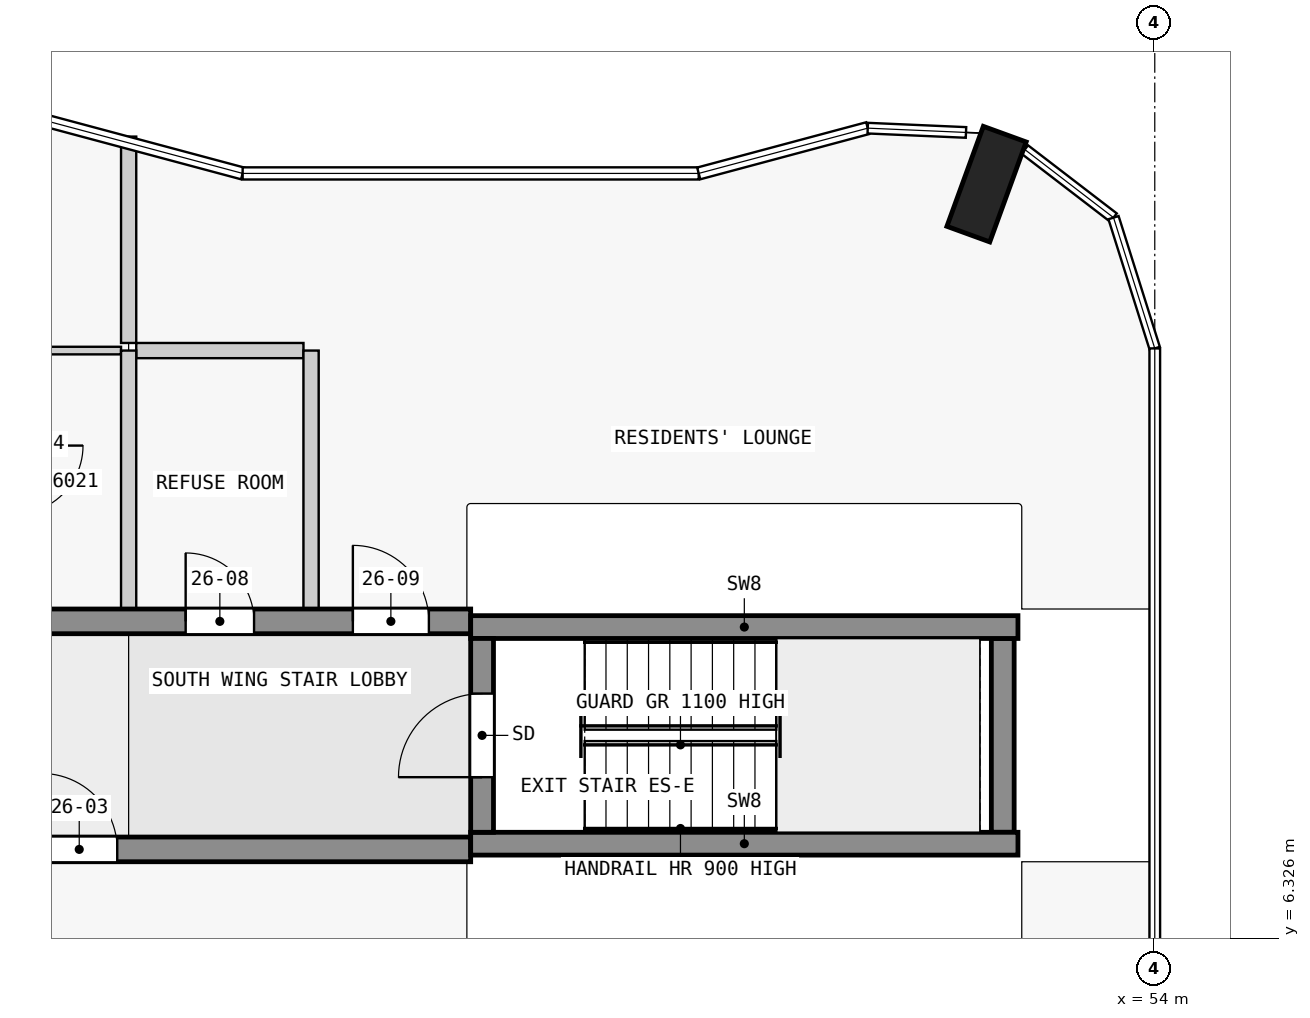
"""IFC4 building model, lengths in metres.
Left out: names, types, materials, properties, quantities, classifications, styles, units other than length and angle.
Written with IfcOpenShell. Run it as: python <this file> out.ifc"""

import sys

from ifc_helpers import new_model, si_unit, direction, frame, frame_2d, origin, origin_2d, place, context, subcontext, project, spatial, rectangle, extrude, element, fill, save


model = new_model("IFC4")
c1 = context("Model", 3, precision=1e-05, world=origin(), true_north=direction((0.0, 1.0)))
c2 = subcontext(c1, "Body", "Model", "MODEL_VIEW")
j1 = project(units=[si_unit("LENGTHUNIT", "METRE"), si_unit("PLANEANGLEUNIT", "RADIAN")], contexts=[c1])
p1 = place(None, origin())
s1 = spatial("IfcSite", under=j1, at=p1, CompositionType="ELEMENT")
p2 = place(p1, origin())
s2 = spatial("IfcBuilding", under=s1, at=p2, CompositionType="ELEMENT")
p3 = place(p2, frame((0.0, 0.0, 102.8)))
s3 = spatial("IfcBuildingStorey", under=s2, at=p3, CompositionType="ELEMENT", Elevation=102.8)
p4 = place(p3, frame((51.787, 16.252, 0.0), z_axis=(0.0, 0.0, 1.0), x_axis=(-0.939664280925, 0.342097996418, 0.0)))
e1 = element("IfcColumn", 1, at=p4, inside=s3, PredefinedType="COLUMN", context=c2, shape_type="SweptSolid", body=[
    extrude(rectangle(XDim=0.6, YDim=1.4, at=origin_2d()), origin(), (0.0, 0.0, 1.0), 3.5),
])
p5 = place(p3, frame((45.15, 7.725, 0.0), z_axis=(0.0, 0.0, 1.0), x_axis=(0.0, 1.0, 0.0)))
e2 = element("IfcWall", 2, at=p5, inside=s3, PredefinedType="SHEAR", context=c2, shape_type="SweptSolid", body=[
    extrude(rectangle(XDim=2.55, YDim=0.3, at=frame_2d((1.275, 0.0))), origin(), (0.0, 0.0, 1.0), 3.5),
])
p6 = place(p5, frame((0.725, 0.0, 0.0)))
e3 = element("IfcOpeningElement", 3, at=p6, cuts=e2, PredefinedType="OPENING", context=c2, shape_type="SweptSolid", body=[
    extrude(rectangle(XDim=1.1, YDim=2.1, at=frame_2d((0.55, 1.05))), frame((0.0, 0.16, 0.0), z_axis=(0.0, -1.0, 0.0), x_axis=(1.0, 0.0, 0.0)), (0.0, 0.0, 1.0), 0.32),
])
p7 = place(p3, frame((52.0, 7.725, 0.0), z_axis=(0.0, 0.0, 1.0), x_axis=(0.0, 1.0, 0.0)))
e4 = element("IfcWall", 4, at=p7, inside=s3, PredefinedType="SHEAR", context=c2, shape_type="SweptSolid", body=[
    extrude(rectangle(XDim=2.55, YDim=0.3, at=frame_2d((1.275, 0.0))), origin(), (0.0, 0.0, 1.0), 3.5),
])
for number, where, z_axis, x_axis in (
    (5, (45.0, 7.575, 0.0), (0.0, 0.0, 1.0), (1.0, 0.0, 0.0)),
    (6, (45.0, 10.425, 0.0), (0.0, 0.0, 1.0), (1.0, 0.0, 0.0)),
):
    element("IfcWall", number, at=place(p3, frame(where, z_axis=z_axis, x_axis=x_axis)), inside=s3, PredefinedType="SHEAR", context=c2, shape_type="SweptSolid", body=[
        extrude(rectangle(XDim=7.2, YDim=0.3, at=frame_2d((3.6, 0.0))), origin(), (0.0, 0.0, 1.0), 3.5),
    ])
p8 = place(p3, frame((22.5, 7.5, 0.0), z_axis=(0.0, 0.0, 1.0), x_axis=(1.0, 0.0, 0.0)))
e7 = element("IfcWall", 7, at=p8, inside=s3, PredefinedType="SHEAR", context=c2, shape_type="SweptSolid", body=[
    extrude(rectangle(XDim=22.5, YDim=0.325, at=frame_2d((11.25, 0.0))), origin(), (0.0, 0.0, 1.0), 3.25),
])
p9 = place(p8, frame((4.05, 0.0, 0.0)))
e8 = element("IfcOpeningElement", 8, at=p9, cuts=e7, PredefinedType="OPENING", context=c2, shape_type="SweptSolid", body=[
    extrude(rectangle(XDim=1.0, YDim=2.1, at=frame_2d((0.5, 1.05))), frame((0.0, 0.172, 0.0), z_axis=(0.0, -1.0, 0.0), x_axis=(1.0, 0.0, 0.0)), (0.0, 0.0, 1.0), 0.345),
])
p10 = place(p8, frame((10.75, 0.0, 0.0)))
e9 = element("IfcOpeningElement", 9, at=p10, cuts=e7, PredefinedType="OPENING", context=c2, shape_type="SweptSolid", body=[
    extrude(rectangle(XDim=1.0, YDim=2.1, at=frame_2d((0.5, 1.05))), frame((0.0, 0.172, 0.0), z_axis=(0.0, -1.0, 0.0), x_axis=(1.0, 0.0, 0.0)), (0.0, 0.0, 1.0), 0.345),
])
p11 = place(p8, frame((16.85, 0.0, 0.0)))
e10 = element("IfcOpeningElement", 10, at=p11, cuts=e7, PredefinedType="OPENING", context=c2, shape_type="SweptSolid", body=[
    extrude(rectangle(XDim=1.0, YDim=2.1, at=frame_2d((0.5, 1.05))), frame((0.0, 0.172, 0.0), z_axis=(0.0, -1.0, 0.0), x_axis=(1.0, 0.0, 0.0)), (0.0, 0.0, 1.0), 0.345),
])
p12 = place(p3, frame((22.5, 10.5, 0.0), z_axis=(0.0, 0.0, 1.0), x_axis=(1.0, 0.0, 0.0)))
e11 = element("IfcWall", 11, at=p12, inside=s3, PredefinedType="SHEAR", context=c2, shape_type="SweptSolid", body=[
    extrude(rectangle(XDim=22.5, YDim=0.325, at=frame_2d((11.25, 0.0))), origin(), (0.0, 0.0, 1.0), 3.25),
])
p13 = place(p12, frame((1.75, 0.0, 0.0)))
e12 = element("IfcOpeningElement", 12, at=p13, cuts=e11, PredefinedType="OPENING", context=c2, shape_type="SweptSolid", body=[
    extrude(rectangle(XDim=1.0, YDim=2.1, at=frame_2d((0.5, 1.05))), frame((0.0, 0.172, 0.0), z_axis=(0.0, -1.0, 0.0), x_axis=(1.0, 0.0, 0.0)), (0.0, 0.0, 1.0), 0.345),
])
p14 = place(p12, frame((6.25, 0.0, 0.0)))
e13 = element("IfcOpeningElement", 13, at=p14, cuts=e11, PredefinedType="OPENING", context=c2, shape_type="SweptSolid", body=[
    extrude(rectangle(XDim=1.0, YDim=2.1, at=frame_2d((0.5, 1.05))), frame((0.0, 0.172, 0.0), z_axis=(0.0, -1.0, 0.0), x_axis=(1.0, 0.0, 0.0)), (0.0, 0.0, 1.0), 0.345),
])
p15 = place(p12, frame((10.85, 0.0, 0.0)))
e14 = element("IfcOpeningElement", 14, at=p15, cuts=e11, PredefinedType="OPENING", context=c2, shape_type="SweptSolid", body=[
    extrude(rectangle(XDim=0.9, YDim=2.1, at=frame_2d((0.45, 1.05))), frame((0.0, 0.172, 0.0), z_axis=(0.0, -1.0, 0.0), x_axis=(1.0, 0.0, 0.0)), (0.0, 0.0, 1.0), 0.345),
])
p16 = place(p12, frame((15.25, 0.0, 0.0)))
e15 = element("IfcOpeningElement", 15, at=p16, cuts=e11, PredefinedType="OPENING", context=c2, shape_type="SweptSolid", body=[
    extrude(rectangle(XDim=1.0, YDim=2.1, at=frame_2d((0.5, 1.05))), frame((0.0, 0.172, 0.0), z_axis=(0.0, -1.0, 0.0), x_axis=(1.0, 0.0, 0.0)), (0.0, 0.0, 1.0), 0.345),
])
p17 = place(p12, frame((18.75, 0.0, 0.0)))
e16 = element("IfcOpeningElement", 16, at=p17, cuts=e11, PredefinedType="OPENING", context=c2, shape_type="SweptSolid", body=[
    extrude(rectangle(XDim=0.9, YDim=2.1, at=frame_2d((0.45, 1.05))), frame((0.0, 0.172, 0.0), z_axis=(0.0, -1.0, 0.0), x_axis=(1.0, 0.0, 0.0)), (0.0, 0.0, 1.0), 0.345),
])
p18 = place(p12, frame((20.95, 0.0, 0.0)))
e17 = element("IfcOpeningElement", 17, at=p18, cuts=e11, PredefinedType="OPENING", context=c2, shape_type="SweptSolid", body=[
    extrude(rectangle(XDim=1.0, YDim=2.1, at=frame_2d((0.5, 1.05))), frame((0.0, 0.172, 0.0), z_axis=(0.0, -1.0, 0.0), x_axis=(1.0, 0.0, 0.0)), (0.0, 0.0, 1.0), 0.345),
])
p19 = place(p3, frame((40.4, 14.062, 0.0), z_axis=(0.0, 0.0, 1.0), x_axis=(-1.0, 0.0, 0.0)))
e18 = element("IfcWall", 18, at=p19, inside=s3, PredefinedType="PARTITIONING", context=c2, shape_type="SweptSolid", body=[
    extrude(rectangle(XDim=1.35, YDim=0.1, at=frame_2d((0.675, 0.0))), origin(), (0.0, 0.0, 1.0), 3.25),
])
p20 = place(p3, frame((42.8, 14.062, 0.0), z_axis=(0.0, 0.0, 1.0), x_axis=(-1.0, 0.0, 0.0)))
e19 = element("IfcWall", 19, at=p20, inside=s3, PredefinedType="PARTITIONING", context=c2, shape_type="SweptSolid", body=[
    extrude(rectangle(XDim=2.2, YDim=0.2, at=frame_2d((1.1, 0.0))), origin(), (0.0, 0.0, 1.0), 3.25),
])
p21 = place(p3, frame((40.5, 16.878, 0.0), z_axis=(0.0, 0.0, 1.0), x_axis=(0.0, -1.0, 0.0)))
e20 = element("IfcWall", 20, at=p21, inside=s3, PredefinedType="PARTITIONING", context=c2, shape_type="SweptSolid", body=[
    extrude(rectangle(XDim=2.715, YDim=0.2, at=frame_2d((1.357, 0.0))), origin(), (0.0, 0.0, 1.0), 3.25),
])
for number, where, z_axis, x_axis in (
    (21, (40.5, 10.663, 0.0), (0.0, 0.0, 1.0), (0.0, 1.0, 0.0)),
    (22, (42.9, 10.663, 0.0), (0.0, 0.0, 1.0), (0.0, 1.0, 0.0)),
):
    element("IfcWall", number, at=place(p3, frame(where, z_axis=z_axis, x_axis=x_axis)), inside=s3, PredefinedType="PARTITIONING", context=c2, shape_type="SweptSolid", body=[
        extrude(rectangle(XDim=3.4, YDim=0.2, at=frame_2d((1.7, 0.0))), origin(), (0.0, 0.0, 1.0), 3.25),
    ])
p22 = place(p6, origin())
e23 = element("IfcDoor", 23, at=p22, inside=s3, OperationType="SINGLE_SWING_LEFT", PredefinedType="DOOR", context=c2, shape_type="SweptSolid", body=[
    extrude(rectangle(XDim=1.1, YDim=2.1, at=frame_2d((0.55, 1.05))), frame((0.0, 0.025, 0.0), z_axis=(0.0, -1.0, 0.0), x_axis=(1.0, 0.0, 0.0)), (0.0, 0.0, 1.0), 0.05),
])
fill(e3, e23)
p23 = place(p11, origin())
e24 = element("IfcDoor", 24, at=p23, inside=s3, OperationType="SINGLE_SWING_RIGHT", PredefinedType="DOOR", context=c2, shape_type="SweptSolid", body=[
    extrude(rectangle(XDim=1.0, YDim=2.1, at=frame_2d((0.5, 1.05))), frame((0.0, 0.025, 0.0), z_axis=(0.0, -1.0, 0.0), x_axis=(1.0, 0.0, 0.0)), (0.0, 0.0, 1.0), 0.05),
])
fill(e10, e24)
p24 = place(p17, origin())
e25 = element("IfcDoor", 25, at=p24, inside=s3, OperationType="SINGLE_SWING_RIGHT", PredefinedType="DOOR", context=c2, shape_type="SweptSolid", body=[
    extrude(rectangle(XDim=0.9, YDim=2.1, at=frame_2d((0.45, 1.05))), frame((0.0, 0.025, 0.0), z_axis=(0.0, -1.0, 0.0), x_axis=(1.0, 0.0, 0.0)), (0.0, 0.0, 1.0), 0.05),
])
fill(e16, e25)
p25 = place(p18, origin())
e26 = element("IfcDoor", 26, at=p25, inside=s3, OperationType="SINGLE_SWING_RIGHT", PredefinedType="DOOR", context=c2, shape_type="SweptSolid", body=[
    extrude(rectangle(XDim=1.0, YDim=2.1, at=frame_2d((0.5, 1.05))), frame((0.0, 0.025, 0.0), z_axis=(0.0, -1.0, 0.0), x_axis=(1.0, 0.0, 0.0)), (0.0, 0.0, 1.0), 0.05),
])
fill(e17, e26)
save(model, sys.argv[1])
